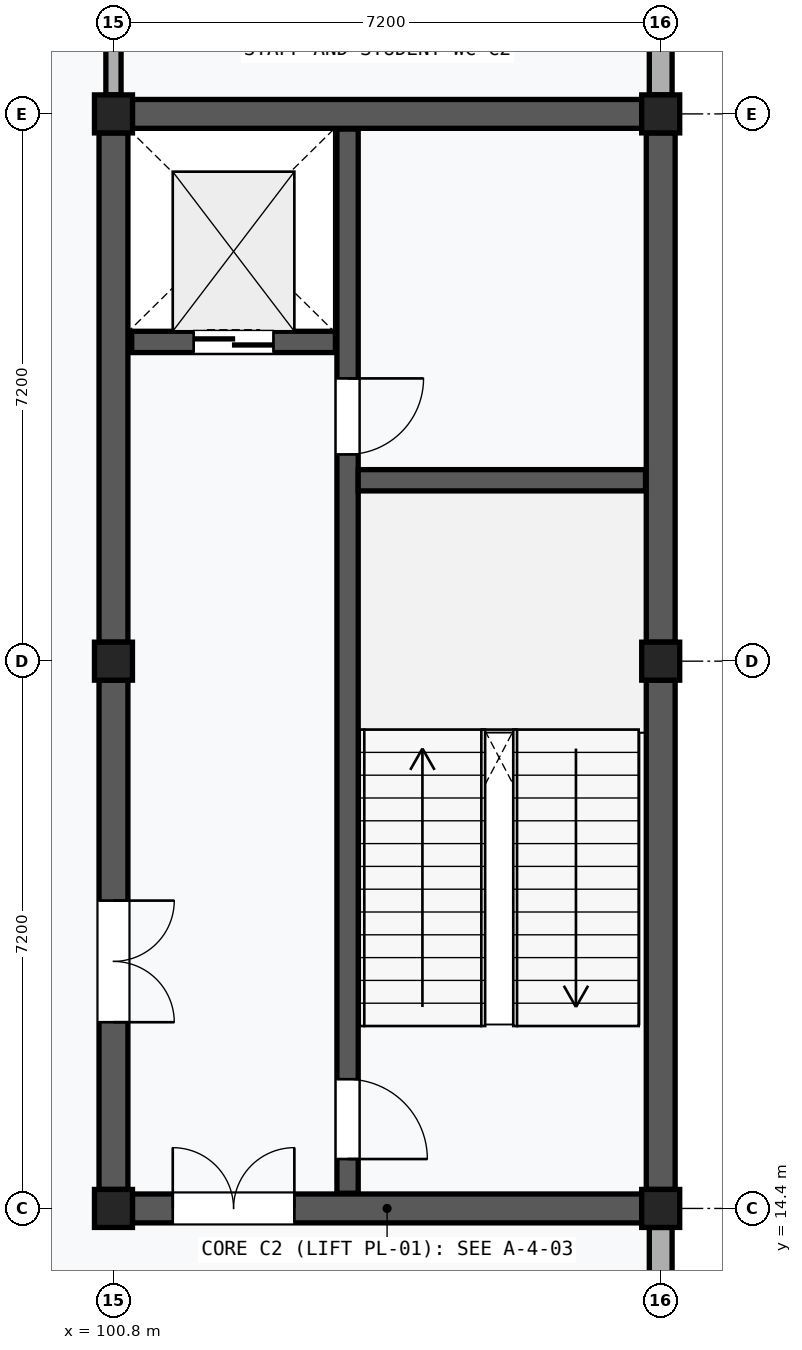
"""IFC4 building model, lengths in metres.
Left out: names, types, materials, properties, quantities, classifications, styles, units other than length and angle.
Written with IfcOpenShell. Run it as: python <this file> out.ifc"""

import sys

from ifc_helpers import new_model, si_unit, direction, frame, frame_2d, origin, origin_2d, place, context, subcontext, project, spatial, rectangle, extrude, element, fill, save


model = new_model("IFC4")
c1 = context("Model", 3, precision=1e-05, world=origin(), true_north=direction((0.0, 1.0)))
c2 = subcontext(c1, "Body", "Model", "MODEL_VIEW")
j1 = project(units=[si_unit("LENGTHUNIT", "METRE"), si_unit("PLANEANGLEUNIT", "RADIAN")], contexts=[c1])
p1 = place(None, origin())
s1 = spatial("IfcSite", under=j1, at=p1, CompositionType="ELEMENT")
p2 = place(p1, origin())
s2 = spatial("IfcBuilding", under=s1, at=p2, CompositionType="ELEMENT")
p3 = place(p2, frame((0.0, 0.0, 46.8)))
s3 = spatial("IfcBuildingStorey", under=s2, at=p3, CompositionType="ELEMENT", Elevation=46.8)
for number, where, z_axis, x_axis in (
    (1, (100.8, 14.4, 0.0), (0.0, 0.0, 1.0), (1.0, 0.0, 0.0)),
    (2, (100.8, 21.6, 0.0), (0.0, 0.0, 1.0), (1.0, 0.0, 0.0)),
    (3, (100.8, 28.8, 0.0), (0.0, 0.0, 1.0), (1.0, 0.0, 0.0)),
    (4, (108.0, 14.4, 0.0), (0.0, 0.0, 1.0), (1.0, 0.0, 0.0)),
    (5, (108.0, 21.6, 0.0), (0.0, 0.0, 1.0), (1.0, 0.0, 0.0)),
    (6, (108.0, 28.8, 0.0), (0.0, 0.0, 1.0), (1.0, 0.0, 0.0)),
):
    element("IfcColumn", number, at=place(p3, frame(where, z_axis=z_axis, x_axis=x_axis)), inside=s3, PredefinedType="COLUMN", context=c2, shape_type="SweptSolid", body=[
        extrude(rectangle(XDim=0.5, YDim=0.5, at=origin_2d()), origin(), (0.0, 0.0, 1.0), 4.2),
    ])
p4 = place(p3, frame((108.0, 7.46, 0.0), z_axis=(0.0, 0.0, 1.0), x_axis=(0.0, 1.0, 0.0)))
e7 = element("IfcWall", 7, at=p4, inside=s3, PredefinedType="SOLIDWALL", context=c2, shape_type="SweptSolid", body=[
    extrude(rectangle(XDim=6.69, YDim=0.3, at=frame_2d((3.345, 0.0))), origin(), (0.0, 0.0, 1.0), 3.37),
])
p5 = place(p4, frame((2.445, 0.0, 0.9)))
e8 = element("IfcOpeningElement", 8, at=p5, cuts=e7, PredefinedType="OPENING", context=c2, shape_type="SweptSolid", body=[
    extrude(rectangle(XDim=1.8, YDim=1.8, at=frame_2d((0.9, 0.9))), frame((0.0, 0.162, 0.0), z_axis=(0.0, -1.0, 0.0), x_axis=(1.0, 0.0, 0.0)), (0.0, 0.0, 1.0), 0.324),
])
p6 = place(p3, frame((108.0, 29.05, 0.0), z_axis=(0.0, 0.0, 1.0), x_axis=(0.0, 1.0, 0.0)))
e9 = element("IfcWall", 9, at=p6, inside=s3, PredefinedType="SOLIDWALL", context=c2, shape_type="SweptSolid", body=[
    extrude(rectangle(XDim=6.69, YDim=0.3, at=frame_2d((3.345, 0.0))), origin(), (0.0, 0.0, 1.0), 3.37),
])
p7 = place(p3, frame((100.8, 14.65, 0.0), z_axis=(0.0, 0.0, 1.0), x_axis=(0.0, 1.0, 0.0)))
e10 = element("IfcWall", 10, at=p7, inside=s3, PredefinedType="SHEAR", context=c2, shape_type="SweptSolid", body=[
    extrude(rectangle(XDim=6.7, YDim=0.38, at=frame_2d((3.35, 0.0))), origin(), (0.0, 0.0, 1.0), 3.29),
])
p8 = place(p7, frame((2.2, 0.0, 0.0)))
e11 = element("IfcOpeningElement", 11, at=p8, cuts=e10, PredefinedType="OPENING", context=c2, shape_type="SweptSolid", body=[
    extrude(rectangle(XDim=1.6, YDim=2.2, at=frame_2d((0.8, 1.1))), frame((0.0, 0.202, 0.0), z_axis=(0.0, -1.0, 0.0), x_axis=(1.0, 0.0, 0.0)), (0.0, 0.0, 1.0), 0.404),
])
p9 = place(p3, frame((100.8, 21.85, 0.0), z_axis=(0.0, 0.0, 1.0), x_axis=(0.0, 1.0, 0.0)))
e12 = element("IfcWall", 12, at=p9, inside=s3, PredefinedType="SHEAR", context=c2, shape_type="SweptSolid", body=[
    extrude(rectangle(XDim=6.7, YDim=0.38, at=frame_2d((3.35, 0.0))), origin(), (0.0, 0.0, 1.0), 3.29),
])
p10 = place(p3, frame((108.0, 14.65, 0.0), z_axis=(0.0, 0.0, 1.0), x_axis=(0.0, 1.0, 0.0)))
e13 = element("IfcWall", 13, at=p10, inside=s3, PredefinedType="SHEAR", context=c2, shape_type="SweptSolid", body=[
    extrude(rectangle(XDim=6.7, YDim=0.38, at=frame_2d((3.35, 0.0))), origin(), (0.0, 0.0, 1.0), 3.37),
])
p11 = place(p3, frame((108.0, 21.85, 0.0), z_axis=(0.0, 0.0, 1.0), x_axis=(0.0, 1.0, 0.0)))
e14 = element("IfcWall", 14, at=p11, inside=s3, PredefinedType="SHEAR", context=c2, shape_type="SweptSolid", body=[
    extrude(rectangle(XDim=6.7, YDim=0.38, at=frame_2d((3.35, 0.0))), origin(), (0.0, 0.0, 1.0), 3.37),
])
p12 = place(p3, frame((101.05, 14.4, 0.0), z_axis=(0.0, 0.0, 1.0), x_axis=(1.0, 0.0, 0.0)))
e15 = element("IfcWall", 15, at=p12, inside=s3, PredefinedType="SHEAR", context=c2, shape_type="SweptSolid", body=[
    extrude(rectangle(XDim=6.7, YDim=0.38, at=frame_2d((3.35, 0.0))), origin(), (0.0, 0.0, 1.0), 3.29),
])
p13 = place(p12, frame((0.53, 0.0, 0.0)))
e16 = element("IfcOpeningElement", 16, at=p13, cuts=e15, PredefinedType="OPENING", context=c2, shape_type="SweptSolid", body=[
    extrude(rectangle(XDim=1.6, YDim=2.2, at=frame_2d((0.8, 1.1))), frame((0.0, 0.202, 0.0), z_axis=(0.0, -1.0, 0.0), x_axis=(1.0, 0.0, 0.0)), (0.0, 0.0, 1.0), 0.404),
])
p14 = place(p3, frame((101.05, 28.8, 0.0), z_axis=(0.0, 0.0, 1.0), x_axis=(1.0, 0.0, 0.0)))
e17 = element("IfcWall", 17, at=p14, inside=s3, PredefinedType="SHEAR", context=c2, shape_type="SweptSolid", body=[
    extrude(rectangle(XDim=6.7, YDim=0.38, at=frame_2d((3.35, 0.0))), origin(), (0.0, 0.0, 1.0), 3.29),
])
p15 = place(p3, frame((103.88, 14.6, 0.0), z_axis=(0.0, 0.0, 1.0), x_axis=(0.0, 1.0, 0.0)))
e18 = element("IfcWall", 18, at=p15, inside=s3, PredefinedType="SHEAR", context=c2, shape_type="SweptSolid", body=[
    extrude(rectangle(XDim=14.0, YDim=0.28, at=frame_2d((7.0, 0.0))), origin(), (0.0, 0.0, 1.0), 3.97),
])
p16 = place(p15, frame((0.45, 0.0, 0.0)))
e19 = element("IfcOpeningElement", 19, at=p16, cuts=e18, PredefinedType="OPENING", context=c2, shape_type="SweptSolid", body=[
    extrude(rectangle(XDim=1.05, YDim=2.15, at=frame_2d((0.525, 1.075))), frame((0.0, 0.152, 0.0), z_axis=(0.0, -1.0, 0.0), x_axis=(1.0, 0.0, 0.0)), (0.0, 0.0, 1.0), 0.304),
])
p17 = place(p15, frame((9.72, 0.0, 0.0)))
e20 = element("IfcOpeningElement", 20, at=p17, cuts=e18, PredefinedType="OPENING", context=c2, shape_type="SweptSolid", body=[
    extrude(rectangle(XDim=1.0, YDim=2.15, at=frame_2d((0.5, 1.075))), frame((0.0, 0.152, 0.0), z_axis=(0.0, -1.0, 0.0), x_axis=(1.0, 0.0, 0.0)), (0.0, 0.0, 1.0), 0.304),
])
p18 = place(p3, frame((104.02, 23.98, 0.0), z_axis=(0.0, 0.0, 1.0), x_axis=(1.0, 0.0, 0.0)))
e21 = element("IfcWall", 21, at=p18, inside=s3, PredefinedType="SHEAR", context=c2, shape_type="SweptSolid", body=[
    extrude(rectangle(XDim=3.78, YDim=0.28, at=frame_2d((1.89, 0.0))), origin(), (0.0, 0.0, 1.0), 3.97),
])
p19 = place(p3, frame((101.04, 25.8, 0.0), z_axis=(0.0, 0.0, 1.0), x_axis=(1.0, 0.0, 0.0)))
e22 = element("IfcWall", 22, at=p19, inside=s3, PredefinedType="SHEAR", context=c2, shape_type="SweptSolid", body=[
    extrude(rectangle(XDim=2.68, YDim=0.28, at=frame_2d((1.34, 0.0))), origin(), (0.0, 0.0, 1.0), 3.97),
])
p20 = place(p19, frame((0.815, 0.0, 0.0)))
e23 = element("IfcOpeningElement", 23, at=p20, cuts=e22, PredefinedType="OPENING", context=c2, shape_type="SweptSolid", body=[
    extrude(rectangle(XDim=1.05, YDim=2.2, at=frame_2d((0.525, 1.1))), frame((0.0, 0.152, 0.0), z_axis=(0.0, -1.0, 0.0), x_axis=(1.0, 0.0, 0.0)), (0.0, 0.0, 1.0), 0.304),
])
p21 = place(p3, frame((100.8, 29.05, 0.0), z_axis=(0.0, 0.0, 1.0), x_axis=(0.0, 1.0, 0.0)))
e24 = element("IfcWall", 24, at=p21, inside=s3, PredefinedType="PARTITIONING", context=c2, shape_type="SweptSolid", body=[
    extrude(rectangle(XDim=6.7, YDim=0.2, at=frame_2d((3.35, 0.0))), origin(), (0.0, 0.0, 1.0), 3.29),
])
p22 = place(p21, frame((2.79, 0.0, 0.0)))
e25 = element("IfcOpeningElement", 25, at=p22, cuts=e24, PredefinedType="OPENING", context=c2, shape_type="SweptSolid", body=[
    extrude(rectangle(XDim=1.12, YDim=2.2, at=frame_2d((0.56, 1.1))), frame((0.0, 0.112, 0.0), z_axis=(0.0, -1.0, 0.0), x_axis=(1.0, 0.0, 0.0)), (0.0, 0.0, 1.0), 0.224),
])
p23 = place(p8, frame((1.6, 0.0, 0.0), z_axis=(0.0, 0.0, 1.0), x_axis=(-1.0, 0.0, 0.0)))
e26 = element("IfcDoor", 26, at=p23, inside=s3, OperationType="DOUBLE_DOOR_SINGLE_SWING", PredefinedType="DOOR", context=c2, shape_type="SweptSolid", body=[
    extrude(rectangle(XDim=1.6, YDim=2.2, at=frame_2d((0.8, 1.1))), frame((0.0, 0.025, 0.0), z_axis=(0.0, -1.0, 0.0), x_axis=(1.0, 0.0, 0.0)), (0.0, 0.0, 1.0), 0.05),
])
fill(e11, e26)
p24 = place(p13, origin())
e27 = element("IfcDoor", 27, at=p24, inside=s3, OperationType="DOUBLE_DOOR_SINGLE_SWING", PredefinedType="DOOR", context=c2, shape_type="SweptSolid", body=[
    extrude(rectangle(XDim=1.6, YDim=2.2, at=frame_2d((0.8, 1.1))), frame((0.0, 0.025, 0.0), z_axis=(0.0, -1.0, 0.0), x_axis=(1.0, 0.0, 0.0)), (0.0, 0.0, 1.0), 0.05),
])
fill(e16, e27)
p25 = place(p16, frame((1.05, 0.0, 0.0), z_axis=(0.0, 0.0, 1.0), x_axis=(-1.0, 0.0, 0.0)))
e28 = element("IfcDoor", 28, at=p25, inside=s3, OperationType="SINGLE_SWING_RIGHT", PredefinedType="DOOR", context=c2, shape_type="SweptSolid", body=[
    extrude(rectangle(XDim=1.05, YDim=2.15, at=frame_2d((0.525, 1.075))), frame((0.0, 0.025, 0.0), z_axis=(0.0, -1.0, 0.0), x_axis=(1.0, 0.0, 0.0)), (0.0, 0.0, 1.0), 0.05),
])
fill(e19, e28)
p26 = place(p17, frame((1.0, 0.0, 0.0), z_axis=(0.0, 0.0, 1.0), x_axis=(-1.0, 0.0, 0.0)))
e29 = element("IfcDoor", 29, at=p26, inside=s3, OperationType="SINGLE_SWING_LEFT", PredefinedType="DOOR", context=c2, shape_type="SweptSolid", body=[
    extrude(rectangle(XDim=1.0, YDim=2.15, at=frame_2d((0.5, 1.075))), frame((0.0, 0.025, 0.0), z_axis=(0.0, -1.0, 0.0), x_axis=(1.0, 0.0, 0.0)), (0.0, 0.0, 1.0), 0.05),
])
fill(e20, e29)
p27 = place(p20, frame((1.05, 0.0, 0.0), z_axis=(0.0, 0.0, 1.0), x_axis=(-1.0, 0.0, 0.0)))
e30 = element("IfcDoor", 30, at=p27, inside=s3, OperationType="DOUBLE_DOOR_SLIDING", PredefinedType="DOOR", context=c2, shape_type="SweptSolid", body=[
    extrude(rectangle(XDim=1.05, YDim=2.2, at=frame_2d((0.525, 1.1))), frame((0.0, 0.025, 0.0), z_axis=(0.0, -1.0, 0.0), x_axis=(1.0, 0.0, 0.0)), (0.0, 0.0, 1.0), 0.05),
])
fill(e23, e30)
save(model, sys.argv[1])
